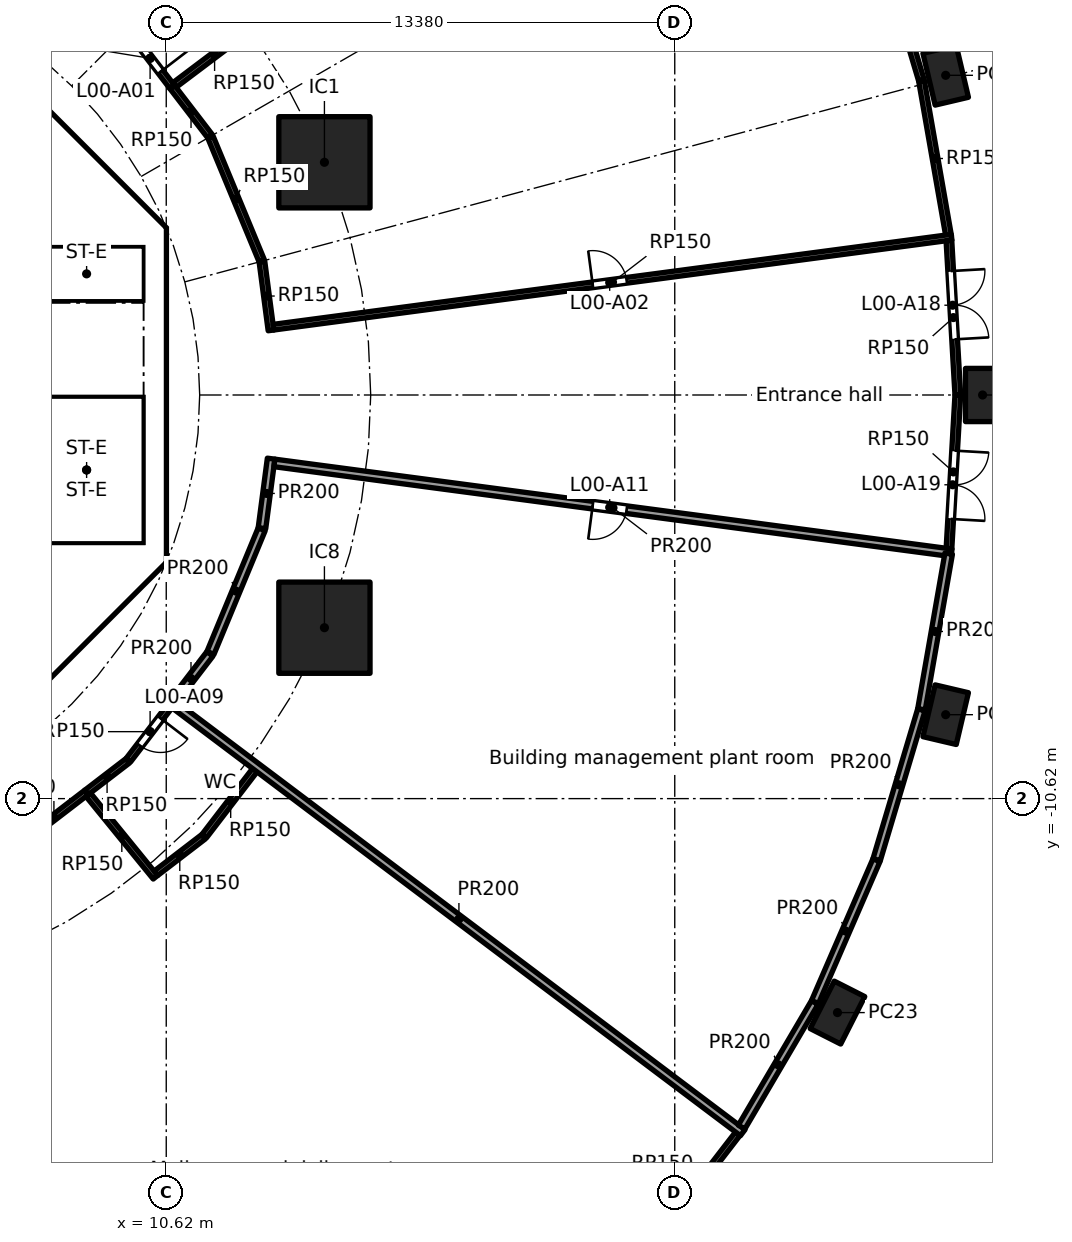
"""IFC4 building model, lengths in metres.
Left out: names, types, materials, properties, quantities, classifications, styles, units other than length and angle.
Written with IfcOpenShell. Run it as: python <this file> out.ifc"""

import sys

from ifc_helpers import new_model, si_unit, direction, frame, frame_2d, origin, origin_2d, place, context, subcontext, project, spatial, polyline, rectangle, hollow_rectangle, outline, extrude, element, fill, save


model = new_model("IFC4")
c1 = context("Model", 3, precision=1e-05, world=origin(), true_north=direction((0.0, 1.0)))
c2 = subcontext(c1, "Body", "Model", "MODEL_VIEW")
j1 = project(units=[si_unit("LENGTHUNIT", "METRE"), si_unit("PLANEANGLEUNIT", "RADIAN")], contexts=[c1])
p1 = place(None, origin())
s1 = spatial("IfcSite", under=j1, at=p1, CompositionType="ELEMENT")
p2 = place(p1, origin())
s2 = spatial("IfcBuilding", under=s1, at=p2, CompositionType="ELEMENT")
p3 = place(p2, origin())
s3 = spatial("IfcBuildingStorey", under=s2, at=p3, CompositionType="ELEMENT", Elevation=0.0)
for number, where, z_axis, x_axis in (
    (1, (32.1, 0.0, 0.0), (0.0, 0.0, 1.0), (0.0, 1.0, 0.0)),
    (2, (31.129, 8.412, 0.0), (0.0, 0.0, 1.0), (-0.229, 0.973, 0.0)),
    (3, (28.282, -16.25, 0.0), (0.0, 0.0, 1.0), (0.452, 0.892, 0.0)),
    (4, (31.129, -8.412, 0.0), (0.0, 0.0, 1.0), (0.229, 0.973, 0.0)),
):
    element("IfcColumn", number, at=place(p3, frame(where, z_axis=z_axis, x_axis=x_axis)), inside=s3, PredefinedType="COLUMN", context=c2, shape_type="SweptSolid", body=[
        extrude(hollow_rectangle(XDim=1.4, YDim=0.9, WallThickness=0.05, at=origin_2d()), origin(), (0.0, 0.0, 1.0), 7.0),
    ])
for number, where, z_axis, x_axis in (
    (5, (14.782, 6.123, 0.0), (0.0, 0.0, 1.0), (1.0, 0.0, 0.0)),
    (6, (14.782, -6.123, 0.0), (0.0, 0.0, 1.0), (1.0, 0.0, 0.0)),
):
    element("IfcColumn", number, at=place(p3, frame(where, z_axis=z_axis, x_axis=x_axis)), inside=s3, PredefinedType="COLUMN", context=c2, shape_type="SweptSolid", body=[
        extrude(rectangle(XDim=2.4, YDim=2.4, at=origin_2d()), origin(), (0.0, 0.0, 1.0), 7.0),
    ])
p4 = place(p3, frame((10.325, -3.801, 0.0), z_axis=(0.0, 0.0, 1.0), x_axis=(0.0, 1.0, 0.0)))
e7 = element("IfcWall", 7, at=p4, inside=s3, PredefinedType="SHEAR", context=c2, shape_type="SweptSolid", body=[
    extrude(rectangle(XDim=7.602, YDim=0.6, at=frame_2d((3.801, 0.0))), origin(), (0.0, 0.0, 1.0), 6.7),
])
p5 = place(p4, frame((6.351, 0.0, 0.0)))
e8 = element("IfcOpeningElement", 8, at=p5, cuts=e7, PredefinedType="OPENING", context=c2, shape_type="SweptSolid", body=[
    extrude(rectangle(XDim=1.1, YDim=2.1, at=frame_2d((0.55, 1.05))), frame((0.0, 0.31, 0.0), z_axis=(0.0, -1.0, 0.0), x_axis=(1.0, 0.0, 0.0)), (0.0, 0.0, 1.0), 0.62),
])
p6 = place(p3, frame((9.988, 4.613, 0.0), z_axis=(0.0, 0.0, 1.0), x_axis=(-0.707106781187, 0.707106781187, 0.0)))
e9 = element("IfcWall", 9, at=p6, inside=s3, PredefinedType="SHEAR", context=c2, shape_type="SweptSolid", body=[
    extrude(rectangle(XDim=7.602, YDim=0.6, at=frame_2d((3.801, 0.0))), origin(), (0.0, 0.0, 1.0), 6.7),
])
p7 = place(p6, frame((3.201, 0.0, 0.0)))
e10 = element("IfcOpeningElement", 10, at=p7, cuts=e9, PredefinedType="OPENING", context=c2, shape_type="SweptSolid", body=[
    extrude(rectangle(XDim=1.2, YDim=2.1, at=frame_2d((0.6, 1.05))), frame((0.0, 0.31, 0.0), z_axis=(0.0, -1.0, 0.0), x_axis=(1.0, 0.0, 0.0)), (0.0, 0.0, 1.0), 0.62),
])
p8 = place(p3, frame((4.613, -9.988, 0.0), z_axis=(0.0, 0.0, 1.0), x_axis=(0.707106781187, 0.707106781187, 0.0)))
e11 = element("IfcWall", 11, at=p8, inside=s3, PredefinedType="SHEAR", context=c2, shape_type="SweptSolid", body=[
    extrude(rectangle(XDim=7.602, YDim=0.6, at=frame_2d((3.801, 0.0))), origin(), (0.0, 0.0, 1.0), 6.7),
])
p9 = place(p8, frame((3.201, 0.0, 0.0)))
e12 = element("IfcOpeningElement", 12, at=p9, cuts=e11, PredefinedType="OPENING", context=c2, shape_type="SweptSolid", body=[
    extrude(rectangle(XDim=1.2, YDim=2.1, at=frame_2d((0.6, 1.05))), frame((0.0, 0.31, 0.0), z_axis=(0.0, -1.0, 0.0), x_axis=(1.0, 0.0, 0.0)), (0.0, 0.0, 1.0), 0.62),
])
p10 = place(p3, frame((6.7, 4.0, 0.0), z_axis=(0.0, 0.0, 1.0), x_axis=(1.0, 0.0, 0.0)))
e13 = element("IfcWall", 13, at=p10, inside=s3, PredefinedType="SOLIDWALL", context=c2, shape_type="SweptSolid", body=[
    extrude(rectangle(XDim=3.325, YDim=0.2, at=frame_2d((1.662, 0.0))), origin(), (0.0, 0.0, 1.0), 6.7),
])
p11 = place(p10, frame((1.25, 0.0, 0.0)))
e14 = element("IfcOpeningElement", 14, at=p11, cuts=e13, PredefinedType="OPENING", context=c2, shape_type="SweptSolid", body=[
    extrude(rectangle(XDim=1.1, YDim=2.1, at=frame_2d((0.55, 1.05))), frame((0.0, 0.11, 0.0), z_axis=(0.0, -1.0, 0.0), x_axis=(1.0, 0.0, 0.0)), (0.0, 0.0, 1.0), 0.22),
])
p12 = place(p3, origin())
e15 = element("IfcWall", 15, at=p12, inside=s3, PredefinedType="SHEAR", context=c2, shape_type="SweptSolid", body=[
    extrude(outline(polyline([(10.2, -4.825), (9.776, -4.401), (10.025, -4.152), (10.025, -3.801), (10.625, -3.801), (10.625, -4.401), (10.2, -4.825)])), origin(), (0.0, 0.0, 1.0), 6.7),
])
p13 = place(p3, origin())
e16 = element("IfcWall", 16, at=p13, inside=s3, PredefinedType="SHEAR", context=c2, shape_type="SweptSolid", body=[
    extrude(outline(polyline([(10.625, 3.801), (10.025, 3.801), (10.025, 4.152), (9.776, 4.401), (10.2, 4.825), (10.625, 4.401), (10.625, 3.801)])), origin(), (0.0, 0.0, 1.0), 6.7),
])
p14 = place(p3, origin())
e17 = element("IfcWall", 17, at=p14, inside=s3, PredefinedType="SOLIDWALL", context=c2, shape_type="SweptSolid", body=[
    extrude(outline(polyline([(10.025, -4.1), (6.7, -4.1), (6.7, -3.9), (10.025, -3.9), (10.025, -4.1)])), origin(), (0.0, 0.0, 1.0), 6.7),
])
p15 = place(p3, frame((8.519, -10.459, 0.0), z_axis=(0.0, 0.0, 1.0), x_axis=(-0.793372937326, -0.608735888805, 0.0)))
e18 = element("IfcWall", 18, at=p15, inside=s3, PredefinedType="PARTITIONING", context=c2, shape_type="SweptSolid", body=[
    extrude(rectangle(XDim=2.155, YDim=0.15, at=frame_2d((1.078, 0.0))), origin(), (0.0, 0.0, 1.0), 6.7),
])
p16 = place(p3, frame((9.607, -9.624, 0.0), z_axis=(0.0, 0.0, 1.0), x_axis=(-0.793371316762, -0.6087380009, 0.0)))
e19 = element("IfcWall", 19, at=p16, inside=s3, PredefinedType="PARTITIONING", context=c2, shape_type="SweptSolid", body=[
    extrude(rectangle(XDim=1.371, YDim=0.15, at=frame_2d((0.686, 0.0))), origin(), (0.0, 0.0, 1.0), 6.7),
])
p17 = place(p3, frame((10.336, -12.689, 0.0), z_axis=(0.0, 0.0, 1.0), x_axis=(-0.631537140908, 0.775345625934, 0.0)))
e20 = element("IfcWall", 20, at=p17, inside=s3, PredefinedType="PARTITIONING", context=c2, shape_type="SweptSolid", body=[
    extrude(rectangle(XDim=2.801, YDim=0.15, at=frame_2d((1.401, 0.0))), origin(), (0.0, 0.0, 1.0), 6.7),
])
p18 = place(p3, frame((10.774, -8.109, 0.0), z_axis=(0.0, 0.0, 1.0), x_axis=(-0.608754453805, -0.793358692504, 0.0)))
e21 = element("IfcWall", 21, at=p18, inside=s3, PredefinedType="PARTITIONING", context=c2, shape_type="SweptSolid", body=[
    extrude(rectangle(XDim=1.888, YDim=0.15, at=frame_2d((0.944, 0.0))), origin(), (0.0, 0.0, 1.0), 6.7),
])
p19 = place(p18, frame((0.5, 0.0, 0.0)))
e22 = element("IfcOpeningElement", 22, at=p19, cuts=e21, PredefinedType="OPENING", context=c2, shape_type="SweptSolid", body=[
    extrude(rectangle(XDim=0.9, YDim=2.1, at=frame_2d((0.45, 1.05))), frame((0.0, 0.085, 0.0), z_axis=(0.0, -1.0, 0.0), x_axis=(1.0, 0.0, 0.0)), (0.0, 0.0, 1.0), 0.17),
])
p20 = place(p3, frame((10.774, 8.109, 0.0), z_axis=(0.0, 0.0, 1.0), x_axis=(-0.608754453805, 0.793358692504, 0.0)))
e23 = element("IfcWall", 23, at=p20, inside=s3, PredefinedType="PARTITIONING", context=c2, shape_type="SweptSolid", body=[
    extrude(rectangle(XDim=1.888, YDim=0.15, at=frame_2d((0.944, 0.0))), origin(), (0.0, 0.0, 1.0), 6.7),
])
p21 = place(p20, frame((0.5, 0.0, 0.0)))
e24 = element("IfcOpeningElement", 24, at=p21, cuts=e23, PredefinedType="OPENING", context=c2, shape_type="SweptSolid", body=[
    extrude(rectangle(XDim=0.9, YDim=2.1, at=frame_2d((0.45, 1.05))), frame((0.0, 0.085, 0.0), z_axis=(0.0, -1.0, 0.0), x_axis=(1.0, 0.0, 0.0)), (0.0, 0.0, 1.0), 0.17),
])
p22 = place(p3, frame((11.604, -11.621, 0.0), z_axis=(0.0, 0.0, 1.0), x_axis=(-0.793385500572, -0.608719514622, 0.0)))
e25 = element("IfcWall", 25, at=p22, inside=s3, PredefinedType="PARTITIONING", context=c2, shape_type="SweptSolid", body=[
    extrude(rectangle(XDim=1.584, YDim=0.15, at=frame_2d((0.792, 0.0))), origin(), (0.0, 0.0, 1.0), 6.7),
])
p23 = place(p3, frame((11.771, 6.809, 0.0), z_axis=(0.0, 0.0, 1.0), x_axis=(-0.608716251771, 0.793388003961, 0.0)))
e26 = element("IfcWall", 26, at=p23, inside=s3, PredefinedType="PARTITIONING", context=c2, shape_type="SweptSolid", body=[
    extrude(rectangle(XDim=1.638, YDim=0.15, at=frame_2d((0.819, 0.0))), origin(), (0.0, 0.0, 1.0), 6.7),
])
p24 = place(p3, frame((13.011, -9.793, 0.0), z_axis=(0.0, 0.0, 1.0), x_axis=(-0.60872331989, -0.793382580992, 0.0)))
e27 = element("IfcWall", 27, at=p24, inside=s3, PredefinedType="PARTITIONING", context=c2, shape_type="SweptSolid", body=[
    extrude(rectangle(XDim=2.283, YDim=0.15, at=frame_2d((1.142, 0.0))), origin(), (0.0, 0.0, 1.0), 6.7),
])
p25 = place(p3, frame((12.951, 9.748, 0.0), z_axis=(0.0, 0.0, 1.0), x_axis=(-0.798970748419, -0.601369888813, 0.0)))
e28 = element("IfcWall", 28, at=p25, inside=s3, PredefinedType="PARTITIONING", context=c2, shape_type="SweptSolid", body=[
    extrude(rectangle(XDim=2.65, YDim=0.15, at=frame_2d((1.325, 0.0))), origin(), (0.0, 0.0, 1.0), 6.7),
])
p26 = place(p3, frame((13.132, 3.531, 0.0), z_axis=(0.0, 0.0, 1.0), x_axis=(-0.382677866108, 0.923881838111, 0.0)))
e29 = element("IfcWall", 29, at=p26, inside=s3, PredefinedType="PARTITIONING", context=c2, shape_type="SweptSolid", body=[
    extrude(rectangle(XDim=3.527, YDim=0.15, at=frame_2d((1.763, 0.0))), origin(), (0.0, 0.0, 1.0), 6.7),
])
p27 = place(p3, frame((13.376, 1.7, 0.0), z_axis=(0.0, 0.0, 1.0), x_axis=(-0.130506449818, 0.99144746031, 0.0)))
e30 = element("IfcWall", 30, at=p27, inside=s3, PredefinedType="PARTITIONING", context=c2, shape_type="SweptSolid", body=[
    extrude(rectangle(XDim=1.824, YDim=0.15, at=frame_2d((0.912, 0.0))), origin(), (0.0, 0.0, 1.0), 6.7),
])
p28 = place(p3, frame((25.652, -19.444, 0.0), z_axis=(0.0, 0.0, 1.0), x_axis=(-0.610389727001, -0.792101244269, 0.0)))
e31 = element("IfcWall", 31, at=p28, inside=s3, PredefinedType="PARTITIONING", context=c2, shape_type="SweptSolid", body=[
    extrude(rectangle(XDim=3.943, YDim=0.15, at=frame_2d((1.972, 0.0))), origin(), (0.0, 0.0, 1.0), 6.7),
])
p29 = place(p3, frame((29.312, 12.228, 0.0), z_axis=(0.0, 0.0, 1.0), x_axis=(0.285840471929, -0.958277216993, 0.0)))
e32 = element("IfcWall", 32, at=p29, inside=s3, PredefinedType="PARTITIONING", context=c2, shape_type="SweptSolid", body=[
    extrude(rectangle(XDim=4.117, YDim=0.15, at=frame_2d((2.059, 0.0))), origin(), (0.0, 0.0, 1.0), 6.7),
])
p30 = place(p3, frame((30.492, 8.271, 0.0), z_axis=(0.0, 0.0, 1.0), x_axis=(0.172163826112, -0.985068331122, 0.0)))
e33 = element("IfcWall", 33, at=p30, inside=s3, PredefinedType="PARTITIONING", context=c2, shape_type="SweptSolid", body=[
    extrude(rectangle(XDim=4.158, YDim=0.15, at=frame_2d((2.079, 0.0))), origin(), (0.0, 0.0, 1.0), 6.7),
])
p31 = place(p3, frame((31.215, -4.042, 0.0), z_axis=(0.0, 0.0, 1.0), x_axis=(0.057493513861, 0.998345879875, 0.0)))
e34 = element("IfcWall", 34, at=p31, inside=s3, PredefinedType="PARTITIONING", context=c2, shape_type="SweptSolid", body=[
    extrude(rectangle(XDim=4.042, YDim=0.15, at=frame_2d((2.021, 0.0))), origin(), (0.0, 0.0, 1.0), 6.7),
])
p32 = place(p31, frame((0.783, 0.0, 0.0)))
e35 = element("IfcOpeningElement", 35, at=p32, cuts=e34, PredefinedType="OPENING", context=c2, shape_type="SweptSolid", body=[
    extrude(rectangle(XDim=1.8, YDim=2.1, at=frame_2d((0.9, 1.05))), frame((0.0, 0.085, 0.0), z_axis=(0.0, -1.0, 0.0), x_axis=(1.0, 0.0, 0.0)), (0.0, 0.0, 1.0), 0.17),
])
p33 = place(p3, frame((31.284, 4.152, 0.0), z_axis=(0.0, 0.0, 1.0), x_axis=(-0.991305556345, -0.131579990725, 0.0)))
e36 = element("IfcWall", 36, at=p33, inside=s3, PredefinedType="PARTITIONING", context=c2, shape_type="SweptSolid", body=[
    extrude(rectangle(XDim=18.0, YDim=0.15, at=frame_2d((9.0, 0.0))), origin(), (0.0, 0.0, 1.0), 6.7),
])
p34 = place(p33, frame((8.625, 0.0, 0.0)))
e37 = element("IfcOpeningElement", 37, at=p34, cuts=e36, PredefinedType="OPENING", context=c2, shape_type="SweptSolid", body=[
    extrude(rectangle(XDim=0.9, YDim=2.1, at=frame_2d((0.45, 1.05))), frame((0.0, 0.085, 0.0), z_axis=(0.0, -1.0, 0.0), x_axis=(1.0, 0.0, 0.0)), (0.0, 0.0, 1.0), 0.17),
])
p35 = place(p3, frame((31.448, 0.006, 0.0), z_axis=(0.0, 0.0, 1.0), x_axis=(-0.057497602941, 0.998345644382, 0.0)))
e38 = element("IfcWall", 38, at=p35, inside=s3, PredefinedType="PARTITIONING", context=c2, shape_type="SweptSolid", body=[
    extrude(rectangle(XDim=4.068, YDim=0.15, at=frame_2d((2.034, 0.0))), origin(), (0.0, 0.0, 1.0), 6.7),
])
p36 = place(p35, frame((1.46, 0.0, 0.0)))
e39 = element("IfcOpeningElement", 39, at=p36, cuts=e38, PredefinedType="OPENING", context=c2, shape_type="SweptSolid", body=[
    extrude(rectangle(XDim=1.8, YDim=2.1, at=frame_2d((0.9, 1.05))), frame((0.0, 0.085, 0.0), z_axis=(0.0, -1.0, 0.0), x_axis=(1.0, 0.0, 0.0)), (0.0, 0.0, 1.0), 0.17),
])
p37 = place(p3, frame((10.774, -8.109, 0.0), z_axis=(0.0, 0.0, 1.0), x_axis=(0.608663561698, 0.79342842693, 0.0)))
e40 = element("IfcWall", 40, at=p37, inside=s3, PredefinedType="PARTITIONING", context=c2, shape_type="SweptSolid", body=[
    extrude(rectangle(XDim=1.635, YDim=0.2, at=frame_2d((0.817, 0.0))), origin(), (0.0, 0.0, 1.0), 6.7),
])
p38 = place(p3, frame((11.784, -6.786, 0.0), z_axis=(0.0, 0.0, 1.0), x_axis=(0.382723413813, 0.92386297064, 0.0)))
e41 = element("IfcWall", 41, at=p38, inside=s3, PredefinedType="PARTITIONING", context=c2, shape_type="SweptSolid", body=[
    extrude(rectangle(XDim=3.52, YDim=0.2, at=frame_2d((1.76, 0.0))), origin(), (0.0, 0.0, 1.0), 6.7),
])
p39 = place(p3, frame((13.139, -3.505, 0.0), z_axis=(0.0, 0.0, 1.0), x_axis=(0.130430559403, 0.991457446981, 0.0)))
e42 = element("IfcWall", 42, at=p39, inside=s3, PredefinedType="PARTITIONING", context=c2, shape_type="SweptSolid", body=[
    extrude(rectangle(XDim=1.846, YDim=0.2, at=frame_2d((0.923, 0.0))), origin(), (0.0, 0.0, 1.0), 6.7),
])
p40 = place(p3, frame((13.466, -1.787, 0.0), z_axis=(0.0, 0.0, 1.0), x_axis=(0.991306373283, -0.131573835882, 0.0)))
e43 = element("IfcWall", 43, at=p40, inside=s3, PredefinedType="PARTITIONING", context=c2, shape_type="SweptSolid", body=[
    extrude(rectangle(XDim=17.975, YDim=0.2, at=frame_2d((8.987, 0.0))), origin(), (0.0, 0.0, 1.0), 6.7),
])
p41 = place(p40, frame((8.45, 0.0, 0.0)))
e44 = element("IfcOpeningElement", 44, at=p41, cuts=e43, PredefinedType="OPENING", context=c2, shape_type="SweptSolid", body=[
    extrude(rectangle(XDim=0.9, YDim=2.1, at=frame_2d((0.45, 1.05))), frame((0.0, 0.11, 0.0), z_axis=(0.0, -1.0, 0.0), x_axis=(1.0, 0.0, 0.0)), (0.0, 0.0, 1.0), 0.22),
])
p42 = place(p3, frame((25.788, -19.41, 0.0), z_axis=(0.0, 0.0, 1.0), x_axis=(-0.798975382821, 0.601363731568, 0.0)))
e45 = element("IfcWall", 45, at=p42, inside=s3, PredefinedType="PARTITIONING", context=c2, shape_type="SweptSolid", body=[
    extrude(rectangle(XDim=18.692, YDim=0.2, at=frame_2d((9.346, 0.0))), origin(), (0.0, 0.0, 1.0), 6.7),
])
p43 = place(p3, frame((27.683, -15.985, 0.0), z_axis=(0.0, 0.0, 1.0), x_axis=(-0.506329356613, -0.862340178022, 0.0)))
e46 = element("IfcWall", 46, at=p43, inside=s3, PredefinedType="PARTITIONING", context=c2, shape_type="SweptSolid", body=[
    extrude(rectangle(XDim=3.801, YDim=0.2, at=frame_2d((1.9, 0.0))), origin(), (0.0, 0.0, 1.0), 6.7),
])
p44 = place(p3, frame((29.307, -12.241, 0.0), z_axis=(0.0, 0.0, 1.0), x_axis=(-0.397627665093, -0.917546859813, 0.0)))
e47 = element("IfcWall", 47, at=p44, inside=s3, PredefinedType="PARTITIONING", context=c2, shape_type="SweptSolid", body=[
    extrude(rectangle(XDim=4.065, YDim=0.2, at=frame_2d((2.032, 0.0))), origin(), (0.0, 0.0, 1.0), 6.7),
])
p45 = place(p3, frame((30.488, -8.284, 0.0), z_axis=(0.0, 0.0, 1.0), x_axis=(-0.285801297307, -0.958288901354, 0.0)))
e48 = element("IfcWall", 48, at=p45, inside=s3, PredefinedType="PARTITIONING", context=c2, shape_type="SweptSolid", body=[
    extrude(rectangle(XDim=4.114, YDim=0.2, at=frame_2d((2.057, 0.0))), origin(), (0.0, 0.0, 1.0), 6.7),
])
p46 = place(p3, frame((31.208, -4.175, 0.0), z_axis=(0.0, 0.0, 1.0), x_axis=(-0.172166598585, -0.985067846563, 0.0)))
e49 = element("IfcWall", 49, at=p46, inside=s3, PredefinedType="PARTITIONING", context=c2, shape_type="SweptSolid", body=[
    extrude(rectangle(XDim=4.156, YDim=0.2, at=frame_2d((2.078, 0.0))), origin(), (0.0, 0.0, 1.0), 6.7),
])
p47 = place(p11, frame((1.1, 0.0, 0.0), x_axis=(-1.0, 0.0, 0.0)))
e50 = element("IfcDoor", 50, at=p47, inside=s3, OperationType="SINGLE_SWING_RIGHT", PredefinedType="DOOR", context=c2, shape_type="SweptSolid", body=[
    extrude(rectangle(XDim=1.1, YDim=2.1, at=frame_2d((0.55, 1.05))), frame((0.0, 0.025, 0.0), z_axis=(0.0, -1.0, 0.0), x_axis=(1.0, 0.0, 0.0)), (0.0, 0.0, 1.0), 0.05),
])
fill(e14, e50)
p48 = place(p7, origin())
e51 = element("IfcDoor", 51, at=p48, inside=s3, OperationType="SINGLE_SWING_LEFT", PredefinedType="DOOR", context=c2, shape_type="SweptSolid", body=[
    extrude(rectangle(XDim=1.2, YDim=2.1, at=frame_2d((0.6, 1.05))), frame((0.0, 0.025, 0.0), z_axis=(0.0, -1.0, 0.0), x_axis=(1.0, 0.0, 0.0)), (0.0, 0.0, 1.0), 0.05),
])
fill(e10, e51)
p49 = place(p9, origin())
e52 = element("IfcDoor", 52, at=p49, inside=s3, OperationType="SINGLE_SWING_LEFT", PredefinedType="DOOR", context=c2, shape_type="SweptSolid", body=[
    extrude(rectangle(XDim=1.2, YDim=2.1, at=frame_2d((0.6, 1.05))), frame((0.0, 0.025, 0.0), z_axis=(0.0, -1.0, 0.0), x_axis=(1.0, 0.0, 0.0)), (0.0, 0.0, 1.0), 0.05),
])
fill(e12, e52)
p50 = place(p5, frame((1.1, 0.0, 0.0), x_axis=(-1.0, 0.0, 0.0)))
e53 = element("IfcDoor", 53, at=p50, inside=s3, OperationType="SINGLE_SWING_LEFT", PredefinedType="DOOR", context=c2, shape_type="SweptSolid", body=[
    extrude(rectangle(XDim=1.1, YDim=2.1, at=frame_2d((0.55, 1.05))), frame((0.0, 0.025, 0.0), z_axis=(0.0, -1.0, 0.0), x_axis=(1.0, 0.0, 0.0)), (0.0, 0.0, 1.0), 0.05),
])
fill(e8, e53)
p51 = place(p21, frame((0.9, 0.0, 0.0), x_axis=(-1.0, 0.0, 0.0)))
e54 = element("IfcDoor", 54, at=p51, inside=s3, OperationType="SINGLE_SWING_RIGHT", PredefinedType="DOOR", context=c2, shape_type="SweptSolid", body=[
    extrude(rectangle(XDim=0.9, YDim=2.1, at=frame_2d((0.45, 1.05))), frame((0.0, 0.025, 0.0), z_axis=(0.0, -1.0, 0.0), x_axis=(1.0, 0.0, 0.0)), (0.0, 0.0, 1.0), 0.05),
])
fill(e24, e54)
p52 = place(p34, frame((0.9, 0.0, 0.0), x_axis=(-1.0, 0.0, 0.0)))
e55 = element("IfcDoor", 55, at=p52, inside=s3, OperationType="SINGLE_SWING_LEFT", PredefinedType="DOOR", context=c2, shape_type="SweptSolid", body=[
    extrude(rectangle(XDim=0.9, YDim=2.1, at=frame_2d((0.45, 1.05))), frame((0.0, 0.025, 0.0), z_axis=(0.0, -1.0, 0.0), x_axis=(1.0, 0.0, 0.0)), (0.0, 0.0, 1.0), 0.05),
])
fill(e37, e55)
p53 = place(p19, origin())
e56 = element("IfcDoor", 56, at=p53, inside=s3, OperationType="SINGLE_SWING_LEFT", PredefinedType="DOOR", context=c2, shape_type="SweptSolid", body=[
    extrude(rectangle(XDim=0.9, YDim=2.1, at=frame_2d((0.45, 1.05))), frame((0.0, 0.025, 0.0), z_axis=(0.0, -1.0, 0.0), x_axis=(1.0, 0.0, 0.0)), (0.0, 0.0, 1.0), 0.05),
])
fill(e22, e56)
p54 = place(p41, frame((0.9, 0.0, 0.0), x_axis=(-1.0, 0.0, 0.0)))
e57 = element("IfcDoor", 57, at=p54, inside=s3, OperationType="SINGLE_SWING_RIGHT", PredefinedType="DOOR", context=c2, shape_type="SweptSolid", body=[
    extrude(rectangle(XDim=0.9, YDim=2.1, at=frame_2d((0.45, 1.05))), frame((0.0, 0.025, 0.0), z_axis=(0.0, -1.0, 0.0), x_axis=(1.0, 0.0, 0.0)), (0.0, 0.0, 1.0), 0.05),
])
fill(e44, e57)
p55 = place(p36, frame((1.8, 0.0, 0.0), x_axis=(-1.0, 0.0, 0.0)))
e58 = element("IfcDoor", 58, at=p55, inside=s3, OperationType="DOUBLE_DOOR_SINGLE_SWING", PredefinedType="DOOR", context=c2, shape_type="SweptSolid", body=[
    extrude(rectangle(XDim=1.8, YDim=2.1, at=frame_2d((0.9, 1.05))), frame((0.0, 0.025, 0.0), z_axis=(0.0, -1.0, 0.0), x_axis=(1.0, 0.0, 0.0)), (0.0, 0.0, 1.0), 0.05),
])
fill(e39, e58)
p56 = place(p32, frame((1.8, 0.0, 0.0), x_axis=(-1.0, 0.0, 0.0)))
e59 = element("IfcDoor", 59, at=p56, inside=s3, OperationType="DOUBLE_DOOR_SINGLE_SWING", PredefinedType="DOOR", context=c2, shape_type="SweptSolid", body=[
    extrude(rectangle(XDim=1.8, YDim=2.1, at=frame_2d((0.9, 1.05))), frame((0.0, 0.025, 0.0), z_axis=(0.0, -1.0, 0.0), x_axis=(1.0, 0.0, 0.0)), (0.0, 0.0, 1.0), 0.05),
])
fill(e35, e59)
save(model, sys.argv[1])
